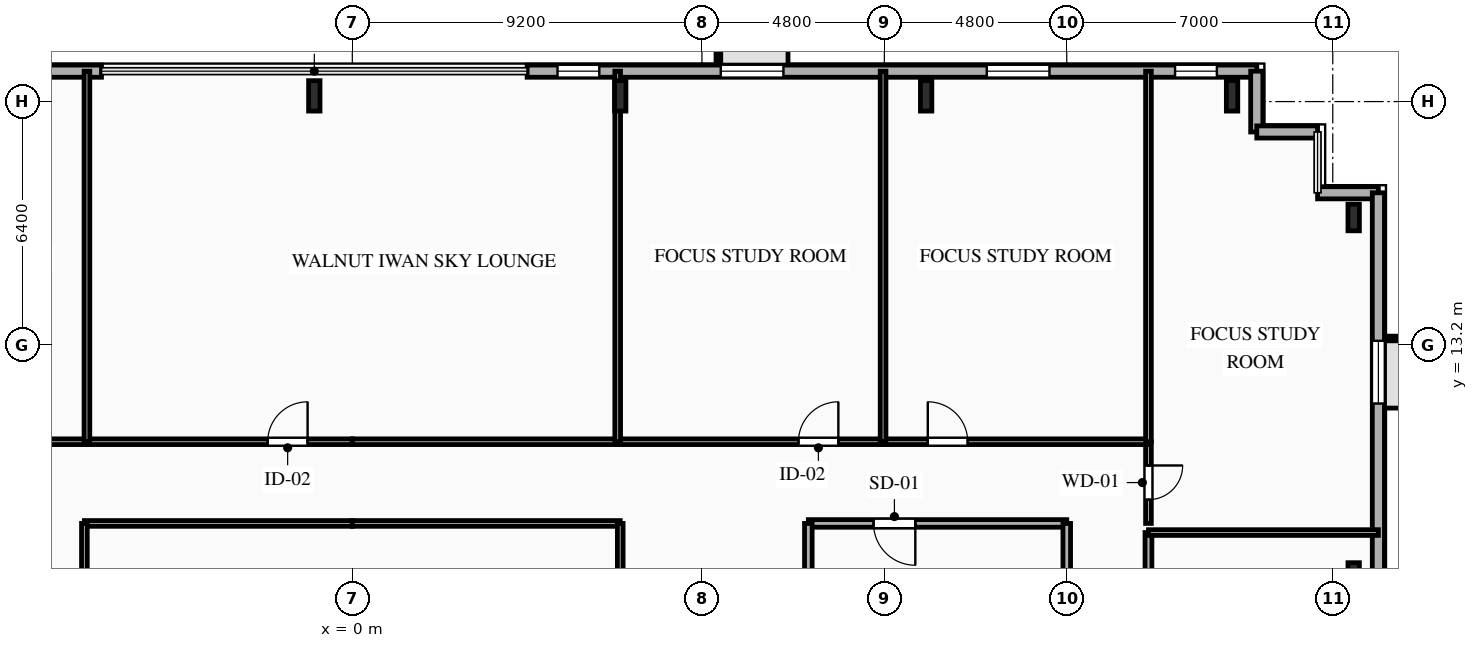
"""IFC4 building model, lengths in metres.
Left out: names, types, materials, properties, quantities, classifications, styles, units other than length and angle.
Written with IfcOpenShell. Run it as: python <this file> out.ifc"""

import sys

from ifc_helpers import new_model, si_unit, direction, frame, frame_2d, origin, origin_2d, place, context, subcontext, project, spatial, rectangle, i_section, extrude, element, fill, save


model = new_model("IFC4")
c1 = context("Model", 3, precision=1e-05, world=origin(), true_north=direction((0.0, 1.0)))
c2 = subcontext(c1, "Body", "Model", "MODEL_VIEW")
j1 = project(units=[si_unit("LENGTHUNIT", "METRE"), si_unit("PLANEANGLEUNIT", "RADIAN")], contexts=[c1])
p1 = place(None, origin())
s1 = spatial("IfcSite", under=j1, at=p1, CompositionType="ELEMENT")
p2 = place(p1, origin())
s2 = spatial("IfcBuilding", under=s1, at=p2, CompositionType="ELEMENT")
p3 = place(p2, frame((0.0, 0.0, 147.75)))
s3 = spatial("IfcBuildingStorey", under=s2, at=p3, CompositionType="ELEMENT", Elevation=147.75)
for number, where, z_axis, x_axis in (
    (1, (23.15, 19.75, 0.0), (0.0, 0.0, 1.0), (1.0, 0.0, 0.0)),
    (2, (15.1, 19.75, 0.0), (0.0, 0.0, 1.0), (1.0, 0.0, 0.0)),
    (3, (7.05, 19.75, 0.0), (0.0, 0.0, 1.0), (1.0, 0.0, 0.0)),
    (4, (-1.0, 19.75, 0.0), (0.0, 0.0, 1.0), (1.0, 0.0, 0.0)),
):
    element("IfcColumn", number, at=place(p3, frame(where, z_axis=z_axis, x_axis=x_axis)), inside=s3, PredefinedType="COLUMN", context=c2, shape_type="SweptSolid", body=[
        extrude(i_section(OverallWidth=0.3, OverallDepth=0.8, WebThickness=0.018, FlangeThickness=0.033, FilletRadius=0.03, at=origin_2d()), origin(), (0.0, 0.0, 1.0), 3.35),
    ])
for number, where, z_axis, x_axis in (
    (5, (26.35, 7.117, 0.0), (0.0, 0.0, 1.0), (1.0, 0.0, 0.0)),
    (6, (26.35, 16.55, 0.0), (0.0, 0.0, 1.0), (1.0, 0.0, 0.0)),
):
    element("IfcColumn", number, at=place(p3, frame(where, z_axis=z_axis, x_axis=x_axis)), inside=s3, PredefinedType="COLUMN", context=c2, shape_type="SweptSolid", body=[
        extrude(i_section(OverallWidth=0.3, OverallDepth=0.7, WebThickness=0.017, FlangeThickness=0.032, FilletRadius=0.027, at=origin_2d()), origin(), (0.0, 0.0, 1.0), 3.35),
    ])
p4 = place(p3, frame((-25.8, 20.4, 0.0), z_axis=(0.0, 0.0, 1.0), x_axis=(1.0, 0.0, 0.0)))
e7 = element("IfcWall", 7, at=p4, inside=s3, PredefinedType="SOLIDWALL", context=c2, shape_type="SweptSolid", body=[
    extrude(rectangle(XDim=19.2, YDim=0.32, at=frame_2d((9.6, 0.0))), origin(), (0.0, 0.0, 1.0), 3.04),
])
p5 = place(p4, frame((2.135, 0.0, 0.85)))
e8 = element("IfcOpeningElement", 8, at=p5, cuts=e7, PredefinedType="OPENING", context=c2, shape_type="SweptSolid", body=[
    extrude(rectangle(XDim=1.65, YDim=1.85, at=frame_2d((0.825, 0.925))), frame((0.0, 0.17, 0.0), z_axis=(0.0, -1.0, 0.0), x_axis=(1.0, 0.0, 0.0)), (0.0, 0.0, 1.0), 0.34),
])
p6 = place(p4, frame((10.68, 0.0, 0.85)))
e9 = element("IfcOpeningElement", 9, at=p6, cuts=e7, PredefinedType="OPENING", context=c2, shape_type="SweptSolid", body=[
    extrude(rectangle(XDim=2.4, YDim=1.95, at=frame_2d((1.2, 0.975))), frame((0.0, 0.17, 0.0), z_axis=(0.0, -1.0, 0.0), x_axis=(1.0, 0.0, 0.0)), (0.0, 0.0, 1.0), 0.34),
])
p7 = place(p3, frame((4.6, 20.4, 0.0), z_axis=(0.0, 0.0, 1.0), x_axis=(1.0, 0.0, 0.0)))
e10 = element("IfcWall", 10, at=p7, inside=s3, PredefinedType="SOLIDWALL", context=c2, shape_type="SweptSolid", body=[
    extrude(rectangle(XDim=19.2, YDim=0.32, at=frame_2d((9.6, 0.0))), origin(), (0.0, 0.0, 1.0), 3.04),
])
p8 = place(p7, frame((0.8, 0.0, 0.85)))
e11 = element("IfcOpeningElement", 11, at=p8, cuts=e10, PredefinedType="OPENING", context=c2, shape_type="SweptSolid", body=[
    extrude(rectangle(XDim=1.1, YDim=1.85, at=frame_2d((0.55, 0.925))), frame((0.0, 0.17, 0.0), z_axis=(0.0, -1.0, 0.0), x_axis=(1.0, 0.0, 0.0)), (0.0, 0.0, 1.0), 0.34),
])
p9 = place(p7, frame((5.095, 0.0, 0.85)))
e12 = element("IfcOpeningElement", 12, at=p9, cuts=e10, PredefinedType="OPENING", context=c2, shape_type="SweptSolid", body=[
    extrude(rectangle(XDim=1.65, YDim=1.85, at=frame_2d((0.825, 0.925))), frame((0.0, 0.17, 0.0), z_axis=(0.0, -1.0, 0.0), x_axis=(1.0, 0.0, 0.0)), (0.0, 0.0, 1.0), 0.34),
])
p10 = place(p7, frame((12.095, 0.0, 0.85)))
e13 = element("IfcOpeningElement", 13, at=p10, cuts=e10, PredefinedType="OPENING", context=c2, shape_type="SweptSolid", body=[
    extrude(rectangle(XDim=1.65, YDim=1.85, at=frame_2d((0.825, 0.925))), frame((0.0, 0.17, 0.0), z_axis=(0.0, -1.0, 0.0), x_axis=(1.0, 0.0, 0.0)), (0.0, 0.0, 1.0), 0.34),
])
p11 = place(p7, frame((17.05, 0.0, 0.85)))
e14 = element("IfcOpeningElement", 14, at=p11, cuts=e10, PredefinedType="OPENING", context=c2, shape_type="SweptSolid", body=[
    extrude(rectangle(XDim=1.1, YDim=1.85, at=frame_2d((0.55, 0.925))), frame((0.0, 0.17, 0.0), z_axis=(0.0, -1.0, 0.0), x_axis=(1.0, 0.0, 0.0)), (0.0, 0.0, 1.0), 0.34),
])
for number, where, z_axis, x_axis in (
    (15, (23.8, 20.4, 0.0), (0.0, 0.0, 1.0), (0.0, -1.0, 0.0)),
    (16, (23.8, 18.8, 0.0), (0.0, 0.0, 1.0), (1.0, 0.0, 0.0)),
):
    element("IfcWall", number, at=place(p3, frame(where, z_axis=z_axis, x_axis=x_axis)), inside=s3, PredefinedType="SOLIDWALL", context=c2, shape_type="SweptSolid", body=[
        extrude(rectangle(XDim=1.6, YDim=0.32, at=frame_2d((0.8, 0.0))), origin(), (0.0, 0.0, 1.0), 3.04),
    ])
p12 = place(p3, frame((25.4, 17.2, 0.0), z_axis=(0.0, 0.0, 1.0), x_axis=(1.0, 0.0, 0.0)))
e17 = element("IfcWall", 17, at=p12, inside=s3, PredefinedType="SOLIDWALL", context=c2, shape_type="SweptSolid", body=[
    extrude(rectangle(XDim=1.6, YDim=0.32, at=frame_2d((0.8, 0.0))), origin(), (0.0, 0.0, 1.0), 3.04),
])
p13 = place(p3, frame((27.0, 17.2, 0.0), z_axis=(0.0, 0.0, 1.0), x_axis=(0.0, -1.0, 0.0)))
e18 = element("IfcWall", 18, at=p13, inside=s3, PredefinedType="SOLIDWALL", context=c2, shape_type="SweptSolid", body=[
    extrude(rectangle(XDim=29.6, YDim=0.32, at=frame_2d((14.8, 0.0))), origin(), (0.0, 0.0, 1.0), 3.04),
])
p14 = place(p13, frame((3.895, 0.0, 0.85)))
e19 = element("IfcOpeningElement", 19, at=p14, cuts=e18, PredefinedType="OPENING", context=c2, shape_type="SweptSolid", body=[
    extrude(rectangle(XDim=1.65, YDim=1.85, at=frame_2d((0.825, 0.925))), frame((0.0, 0.17, 0.0), z_axis=(0.0, -1.0, 0.0), x_axis=(1.0, 0.0, 0.0)), (0.0, 0.0, 1.0), 0.34),
])
p15 = place(p13, frame((13.74, 0.0, 0.85)))
e20 = element("IfcOpeningElement", 20, at=p15, cuts=e18, PredefinedType="OPENING", context=c2, shape_type="SweptSolid", body=[
    extrude(rectangle(XDim=2.2, YDim=1.85, at=frame_2d((1.1, 0.925))), frame((0.0, 0.17, 0.0), z_axis=(0.0, -1.0, 0.0), x_axis=(1.0, 0.0, 0.0)), (0.0, 0.0, 1.0), 0.34),
])
p16 = place(p13, frame((24.135, 0.0, 0.85)))
e21 = element("IfcOpeningElement", 21, at=p16, cuts=e18, PredefinedType="OPENING", context=c2, shape_type="SweptSolid", body=[
    extrude(rectangle(XDim=1.65, YDim=1.85, at=frame_2d((0.825, 0.925))), frame((0.0, 0.17, 0.0), z_axis=(0.0, -1.0, 0.0), x_axis=(1.0, 0.0, 0.0)), (0.0, 0.0, 1.0), 0.34),
])
p17 = place(p3, frame((18.8, 8.5, 0.0), z_axis=(0.0, 0.0, 1.0), x_axis=(-1.0, 0.0, 0.0)))
e22 = element("IfcWall", 22, at=p17, inside=s3, PredefinedType="PARTITIONING", context=c2, shape_type="SweptSolid", body=[
    extrude(rectangle(XDim=6.8, YDim=0.2, at=frame_2d((3.4, 0.0))), origin(), (0.0, 0.0, 1.0), 3.04),
])
p18 = place(p17, frame((3.985, 0.0, 0.0)))
e23 = element("IfcOpeningElement", 23, at=p18, cuts=e22, PredefinedType="OPENING", context=c2, shape_type="SweptSolid", body=[
    extrude(rectangle(XDim=1.1, YDim=2.15, at=frame_2d((0.55, 1.075))), frame((0.0, 0.11, 0.0), z_axis=(0.0, -1.0, 0.0), x_axis=(1.0, 0.0, 0.0)), (0.0, 0.0, 1.0), 0.22),
])
p19 = place(p3, frame((18.8, 5.6, 0.0), z_axis=(0.0, 0.0, 1.0), x_axis=(0.0, 1.0, 0.0)))
e24 = element("IfcWall", 24, at=p19, inside=s3, PredefinedType="PARTITIONING", context=c2, shape_type="SweptSolid", body=[
    extrude(rectangle(XDim=2.9, YDim=0.2, at=frame_2d((1.45, 0.0))), origin(), (0.0, 0.0, 1.0), 2.525),
])
p20 = place(p3, frame((12.0, 8.5, 0.0), z_axis=(0.0, 0.0, 1.0), x_axis=(0.0, -1.0, 0.0)))
e25 = element("IfcWall", 25, at=p20, inside=s3, PredefinedType="PARTITIONING", context=c2, shape_type="SweptSolid", body=[
    extrude(rectangle(XDim=2.9, YDim=0.2, at=frame_2d((1.45, 0.0))), origin(), (0.0, 0.0, 1.0), 3.04),
])
p21 = place(p3, frame((-20.95, 10.65, 0.0), z_axis=(0.0, 0.0, 1.0), x_axis=(1.0, 0.0, 0.0)))
e26 = element("IfcWall", 26, at=p21, inside=s3, PredefinedType="PARTITIONING", context=c2, shape_type="SweptSolid", body=[
    extrude(rectangle(XDim=13.967, YDim=0.15, at=frame_2d((6.983, 0.0))), origin(), (0.0, 0.0, 1.0), 3.04),
])
p22 = place(p21, frame((6.458, 0.0, 0.0)))
e27 = element("IfcOpeningElement", 27, at=p22, cuts=e26, PredefinedType="OPENING", context=c2, shape_type="SweptSolid", body=[
    extrude(rectangle(XDim=1.05, YDim=2.15, at=frame_2d((0.525, 1.075))), frame((0.0, 0.085, 0.0), z_axis=(0.0, -1.0, 0.0), x_axis=(1.0, 0.0, 0.0)), (0.0, 0.0, 1.0), 0.17),
])
p23 = place(p3, frame((-6.983, 10.65, 0.0), z_axis=(0.0, 0.0, 1.0), x_axis=(1.0, 0.0, 0.0)))
e28 = element("IfcWall", 28, at=p23, inside=s3, PredefinedType="PARTITIONING", context=c2, shape_type="SweptSolid", body=[
    extrude(rectangle(XDim=6.983, YDim=0.15, at=frame_2d((3.491, 0.0))), origin(), (0.0, 0.0, 1.0), 3.04),
])
p24 = place(p23, frame((4.756, 0.0, 0.0)))
e29 = element("IfcOpeningElement", 29, at=p24, cuts=e28, PredefinedType="OPENING", context=c2, shape_type="SweptSolid", body=[
    extrude(rectangle(XDim=1.05, YDim=2.15, at=frame_2d((0.525, 1.075))), frame((0.0, 0.085, 0.0), z_axis=(0.0, -1.0, 0.0), x_axis=(1.0, 0.0, 0.0)), (0.0, 0.0, 1.0), 0.17),
])
p25 = place(p3, frame((0.0, 8.5, 0.0), z_axis=(0.0, 0.0, 1.0), x_axis=(-1.0, 0.0, 0.0)))
e30 = element("IfcWall", 30, at=p25, inside=s3, PredefinedType="PARTITIONING", context=c2, shape_type="SweptSolid", body=[
    extrude(rectangle(XDim=7.05, YDim=0.15, at=frame_2d((3.525, 0.0))), origin(), (0.0, 0.0, 1.0), 3.04),
])
p26 = place(p3, frame((20.95, 10.65, 0.0), z_axis=(0.0, 0.0, 1.0), x_axis=(0.0, -1.0, 0.0)))
e31 = element("IfcWall", 31, at=p26, inside=s3, PredefinedType="PARTITIONING", context=c2, shape_type="SweptSolid", body=[
    extrude(rectangle(XDim=2.15, YDim=0.15, at=frame_2d((1.075, 0.0))), origin(), (0.0, 0.0, 1.0), 3.04),
])
p27 = place(p26, frame((0.625, 0.0, 0.0)))
e32 = element("IfcOpeningElement", 32, at=p27, cuts=e31, PredefinedType="OPENING", context=c2, shape_type="SweptSolid", body=[
    extrude(rectangle(XDim=0.9, YDim=2.1, at=frame_2d((0.45, 1.05))), frame((0.0, 0.085, 0.0), z_axis=(0.0, -1.0, 0.0), x_axis=(1.0, 0.0, 0.0)), (0.0, 0.0, 1.0), 0.17),
])
p28 = place(p3, frame((0.0, 10.65, 0.0), z_axis=(0.0, 0.0, 1.0), x_axis=(1.0, 0.0, 0.0)))
e33 = element("IfcWall", 33, at=p28, inside=s3, PredefinedType="PARTITIONING", context=c2, shape_type="SweptSolid", body=[
    extrude(rectangle(XDim=6.983, YDim=0.15, at=frame_2d((3.491, 0.0))), origin(), (0.0, 0.0, 1.0), 3.04),
])
p29 = place(p3, frame((6.983, 10.65, 0.0), z_axis=(0.0, 0.0, 1.0), x_axis=(1.0, 0.0, 0.0)))
e34 = element("IfcWall", 34, at=p29, inside=s3, PredefinedType="PARTITIONING", context=c2, shape_type="SweptSolid", body=[
    extrude(rectangle(XDim=6.984, YDim=0.15, at=frame_2d((3.492, 0.0))), origin(), (0.0, 0.0, 1.0), 3.04),
])
p30 = place(p29, frame((4.757, 0.0, 0.0)))
e35 = element("IfcOpeningElement", 35, at=p30, cuts=e34, PredefinedType="OPENING", context=c2, shape_type="SweptSolid", body=[
    extrude(rectangle(XDim=1.05, YDim=2.15, at=frame_2d((0.525, 1.075))), frame((0.0, 0.085, 0.0), z_axis=(0.0, -1.0, 0.0), x_axis=(1.0, 0.0, 0.0)), (0.0, 0.0, 1.0), 0.17),
])
p31 = place(p3, frame((13.967, 10.65, 0.0), z_axis=(0.0, 0.0, 1.0), x_axis=(1.0, 0.0, 0.0)))
e36 = element("IfcWall", 36, at=p31, inside=s3, PredefinedType="PARTITIONING", context=c2, shape_type="SweptSolid", body=[
    extrude(rectangle(XDim=6.983, YDim=0.15, at=frame_2d((3.492, 0.0))), origin(), (0.0, 0.0, 1.0), 3.04),
])
p32 = place(p31, frame((1.177, 0.0, 0.0)))
e37 = element("IfcOpeningElement", 37, at=p32, cuts=e36, PredefinedType="OPENING", context=c2, shape_type="SweptSolid", body=[
    extrude(rectangle(XDim=1.05, YDim=2.15, at=frame_2d((0.525, 1.075))), frame((0.0, 0.085, 0.0), z_axis=(0.0, -1.0, 0.0), x_axis=(1.0, 0.0, 0.0)), (0.0, 0.0, 1.0), 0.17),
])
p33 = place(p3, frame((7.05, 8.5, 0.0), z_axis=(0.0, 0.0, 1.0), x_axis=(-1.0, 0.0, 0.0)))
e38 = element("IfcWall", 38, at=p33, inside=s3, PredefinedType="PARTITIONING", context=c2, shape_type="SweptSolid", body=[
    extrude(rectangle(XDim=7.05, YDim=0.15, at=frame_2d((3.525, 0.0))), origin(), (0.0, 0.0, 1.0), 3.04),
])
p34 = place(p3, frame((20.95, 8.26, 0.0), z_axis=(0.0, 0.0, 1.0), x_axis=(0.0, -1.0, 0.0)))
e39 = element("IfcWall", 39, at=p34, inside=s3, PredefinedType="PARTITIONING", context=c2, shape_type="SweptSolid", body=[
    extrude(rectangle(XDim=9.57, YDim=0.18, at=frame_2d((4.785, 0.0))), origin(), (0.0, 0.0, 1.0), 3.04),
])
p35 = place(p34, frame((7.064, 0.0, 0.0)))
e40 = element("IfcOpeningElement", 40, at=p35, cuts=e39, PredefinedType="OPENING", context=c2, shape_type="SweptSolid", body=[
    extrude(rectangle(XDim=1.0, YDim=2.15, at=frame_2d((0.5, 1.075))), frame((0.0, 0.1, 0.0), z_axis=(0.0, -1.0, 0.0), x_axis=(1.0, 0.0, 0.0)), (0.0, 0.0, 1.0), 0.2),
])
for number, where, z_axis, x_axis in (
    (41, (-7.05, 8.5, 0.0), (0.0, 0.0, 1.0), (0.0, -1.0, 0.0)),
    (42, (7.05, -0.8, 0.0), (0.0, 0.0, 1.0), (0.0, 1.0, 0.0)),
):
    element("IfcWall", number, at=place(p3, frame(where, z_axis=z_axis, x_axis=x_axis)), inside=s3, PredefinedType="PARTITIONING", context=c2, shape_type="SweptSolid", body=[
        extrude(rectangle(XDim=9.3, YDim=0.15, at=frame_2d((4.65, 0.0))), origin(), (0.0, 0.0, 1.0), 3.04),
    ])
p36 = place(p3, frame((20.95, 8.26, 0.0), z_axis=(0.0, 0.0, 1.0), x_axis=(1.0, 0.0, 0.0)))
e43 = element("IfcWall", 43, at=p36, inside=s3, PredefinedType="PARTITIONING", context=c2, shape_type="SweptSolid", body=[
    extrude(rectangle(XDim=6.05, YDim=0.15, at=frame_2d((3.025, 0.0))), origin(), (0.0, 0.0, 1.0), 3.04),
])
p37 = place(p3, frame((20.95, 10.65, 0.0), z_axis=(0.0, 0.0, 1.0), x_axis=(0.0, 1.0, 0.0)))
e44 = element("IfcWall", 44, at=p37, inside=s3, PredefinedType="PARTITIONING", context=c2, shape_type="SweptSolid", body=[
    extrude(rectangle(XDim=9.75, YDim=0.15, at=frame_2d((4.875, 0.0))), origin(), (0.0, 0.0, 1.0), 2.525),
])
p38 = place(p3, frame((-6.983, 20.4, 0.0), z_axis=(0.0, 0.0, 1.0), x_axis=(0.0, -1.0, 0.0)))
e45 = element("IfcWall", 45, at=p38, inside=s3, PredefinedType="PARTITIONING", context=c2, shape_type="SweptSolid", body=[
    extrude(rectangle(XDim=9.75, YDim=0.15, at=frame_2d((4.875, 0.0))), origin(), (0.0, 0.0, 1.0), 3.04),
])
p39 = place(p3, frame((6.983, 20.4, 0.0), z_axis=(0.0, 0.0, 1.0), x_axis=(0.0, -1.0, 0.0)))
e46 = element("IfcWall", 46, at=p39, inside=s3, PredefinedType="PARTITIONING", context=c2, shape_type="SweptSolid", body=[
    extrude(rectangle(XDim=9.75, YDim=0.15, at=frame_2d((4.875, 0.0))), origin(), (0.0, 0.0, 1.0), 2.525),
])
p40 = place(p3, frame((13.967, 20.4, 0.0), z_axis=(0.0, 0.0, 1.0), x_axis=(0.0, -1.0, 0.0)))
e47 = element("IfcWall", 47, at=p40, inside=s3, PredefinedType="PARTITIONING", context=c2, shape_type="SweptSolid", body=[
    extrude(rectangle(XDim=9.75, YDim=0.15, at=frame_2d((4.875, 0.0))), origin(), (0.0, 0.0, 1.0), 3.04),
])
p41 = place(p8, origin())
e48 = element("IfcWindow", 48, at=p41, inside=s3, PartitioningType="SINGLE_PANEL", PredefinedType="WINDOW", context=c2, shape_type="SweptSolid", body=[
    extrude(rectangle(XDim=1.1, YDim=1.85, at=frame_2d((0.55, 0.925))), frame((0.0, 0.03, 0.0), z_axis=(0.0, -1.0, 0.0), x_axis=(1.0, 0.0, 0.0)), (0.0, 0.0, 1.0), 0.06),
])
fill(e11, e48)
p42 = place(p9, origin())
e49 = element("IfcWindow", 49, at=p42, inside=s3, PartitioningType="SINGLE_PANEL", PredefinedType="WINDOW", context=c2, shape_type="SweptSolid", body=[
    extrude(rectangle(XDim=1.65, YDim=1.85, at=frame_2d((0.825, 0.925))), frame((0.0, 0.03, 0.0), z_axis=(0.0, -1.0, 0.0), x_axis=(1.0, 0.0, 0.0)), (0.0, 0.0, 1.0), 0.06),
])
fill(e12, e49)
p43 = place(p10, origin())
e50 = element("IfcWindow", 50, at=p43, inside=s3, PartitioningType="SINGLE_PANEL", PredefinedType="WINDOW", context=c2, shape_type="SweptSolid", body=[
    extrude(rectangle(XDim=1.65, YDim=1.85, at=frame_2d((0.825, 0.925))), frame((0.0, 0.03, 0.0), z_axis=(0.0, -1.0, 0.0), x_axis=(1.0, 0.0, 0.0)), (0.0, 0.0, 1.0), 0.06),
])
fill(e13, e50)
p44 = place(p11, origin())
e51 = element("IfcWindow", 51, at=p44, inside=s3, PartitioningType="SINGLE_PANEL", PredefinedType="WINDOW", context=c2, shape_type="SweptSolid", body=[
    extrude(rectangle(XDim=1.1, YDim=1.85, at=frame_2d((0.55, 0.925))), frame((0.0, 0.03, 0.0), z_axis=(0.0, -1.0, 0.0), x_axis=(1.0, 0.0, 0.0)), (0.0, 0.0, 1.0), 0.06),
])
fill(e14, e51)
p45 = place(p14, origin())
e52 = element("IfcWindow", 52, at=p45, inside=s3, PartitioningType="SINGLE_PANEL", PredefinedType="WINDOW", context=c2, shape_type="SweptSolid", body=[
    extrude(rectangle(XDim=1.65, YDim=1.85, at=frame_2d((0.825, 0.925))), frame((0.0, 0.03, 0.0), z_axis=(0.0, -1.0, 0.0), x_axis=(1.0, 0.0, 0.0)), (0.0, 0.0, 1.0), 0.06),
])
fill(e19, e52)
p46 = place(p18, origin())
e53 = element("IfcDoor", 53, at=p46, inside=s3, OperationType="SINGLE_SWING_LEFT", PredefinedType="DOOR", context=c2, shape_type="SweptSolid", body=[
    extrude(rectangle(XDim=1.1, YDim=2.15, at=frame_2d((0.55, 1.075))), frame((0.0, 0.025, 0.0), z_axis=(0.0, -1.0, 0.0), x_axis=(1.0, 0.0, 0.0)), (0.0, 0.0, 1.0), 0.05),
])
fill(e23, e53)
p47 = place(p24, origin())
e54 = element("IfcDoor", 54, at=p47, inside=s3, OperationType="SINGLE_SWING_RIGHT", PredefinedType="DOOR", context=c2, shape_type="SweptSolid", body=[
    extrude(rectangle(XDim=1.05, YDim=2.15, at=frame_2d((0.525, 1.075))), frame((0.0, 0.025, 0.0), z_axis=(0.0, -1.0, 0.0), x_axis=(1.0, 0.0, 0.0)), (0.0, 0.0, 1.0), 0.05),
])
fill(e29, e54)
p48 = place(p27, origin())
e55 = element("IfcDoor", 55, at=p48, inside=s3, OperationType="SINGLE_SWING_LEFT", PredefinedType="DOOR", context=c2, shape_type="SweptSolid", body=[
    extrude(rectangle(XDim=0.9, YDim=2.1, at=frame_2d((0.45, 1.05))), frame((0.0, 0.025, 0.0), z_axis=(0.0, -1.0, 0.0), x_axis=(1.0, 0.0, 0.0)), (0.0, 0.0, 1.0), 0.05),
])
fill(e32, e55)
p49 = place(p30, origin())
e56 = element("IfcDoor", 56, at=p49, inside=s3, OperationType="SINGLE_SWING_RIGHT", PredefinedType="DOOR", context=c2, shape_type="SweptSolid", body=[
    extrude(rectangle(XDim=1.05, YDim=2.15, at=frame_2d((0.525, 1.075))), frame((0.0, 0.025, 0.0), z_axis=(0.0, -1.0, 0.0), x_axis=(1.0, 0.0, 0.0)), (0.0, 0.0, 1.0), 0.05),
])
fill(e35, e56)
p50 = place(p32, origin())
e57 = element("IfcDoor", 57, at=p50, inside=s3, OperationType="SINGLE_SWING_LEFT", PredefinedType="DOOR", context=c2, shape_type="SweptSolid", body=[
    extrude(rectangle(XDim=1.05, YDim=2.15, at=frame_2d((0.525, 1.075))), frame((0.0, 0.025, 0.0), z_axis=(0.0, -1.0, 0.0), x_axis=(1.0, 0.0, 0.0)), (0.0, 0.0, 1.0), 0.05),
])
fill(e37, e57)
save(model, sys.argv[1])
